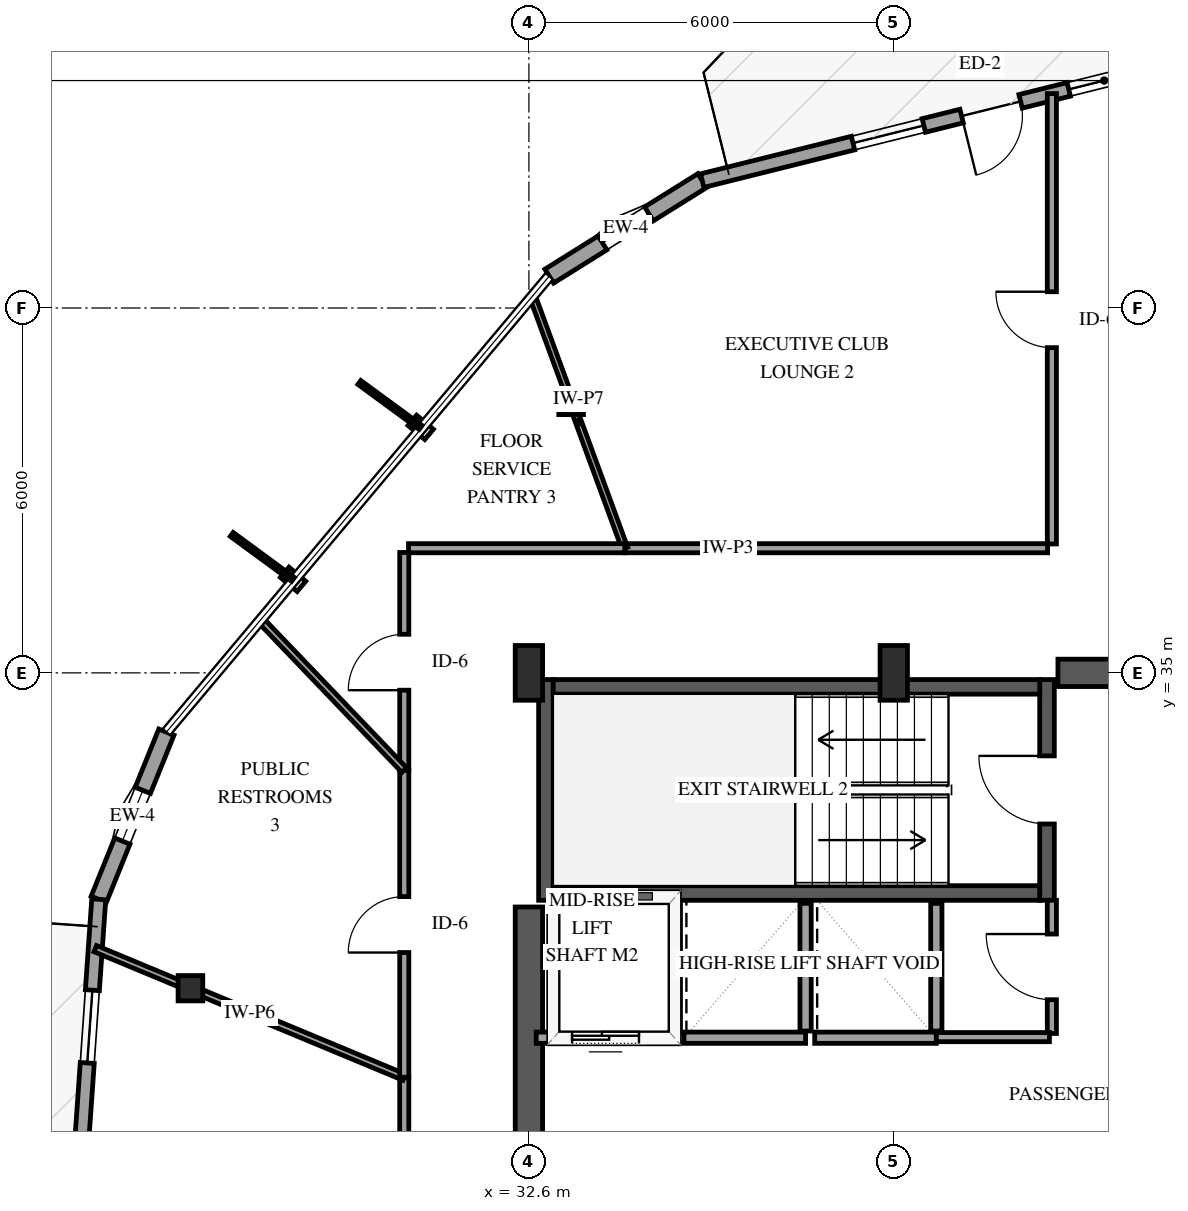
"""IFC4 building model, lengths in metres.
Left out: names, types, materials, properties, quantities, classifications, styles, units other than length and angle.
Written with IfcOpenShell. Run it as: python <this file> out.ifc"""

import sys

from ifc_helpers import new_model, si_unit, direction, frame, frame_2d, origin, origin_2d, place, context, subcontext, project, spatial, rectangle, i_section, extrude, element, fill, save


model = new_model("IFC4")
c1 = context("Model", 3, precision=1e-05, world=origin(), true_north=direction((0.0, 1.0)))
c2 = subcontext(c1, "Body", "Model", "MODEL_VIEW")
j1 = project(units=[si_unit("LENGTHUNIT", "METRE"), si_unit("PLANEANGLEUNIT", "RADIAN")], contexts=[c1])
p1 = place(None, origin())
s1 = spatial("IfcSite", under=j1, at=p1, CompositionType="ELEMENT")
p2 = place(p1, origin())
s2 = spatial("IfcBuilding", under=s1, at=p2, CompositionType="ELEMENT")
p3 = place(p2, frame((0.0, 0.0, 215.8)))
s3 = spatial("IfcBuildingStorey", under=s2, at=p3, CompositionType="ELEMENT", Elevation=215.8)
p4 = place(p3, frame((32.88, 31.26, 0.0), z_axis=(0.0, 0.0, 1.0), x_axis=(0.0, 1.0, 0.0)))
e1 = element("IfcWall", 1, at=p4, inside=s3, PredefinedType="SHEAR", context=c2, shape_type="SweptSolid", body=[
    extrude(rectangle(XDim=3.63, YDim=0.24, at=frame_2d((1.815, 0.0))), origin(), (0.0, 0.0, 1.0), 3.6),
])
p5 = place(p3, frame((41.12, 31.26, 0.0), z_axis=(0.0, 0.0, 1.0), x_axis=(0.0, 1.0, 0.0)))
e2 = element("IfcWall", 2, at=p5, inside=s3, PredefinedType="SHEAR", context=c2, shape_type="SweptSolid", body=[
    extrude(rectangle(XDim=3.63, YDim=0.24, at=frame_2d((1.815, 0.0))), origin(), (0.0, 0.0, 1.0), 3.6),
])
p6 = place(p5, frame((1.255, 0.0, 0.0)))
e3 = element("IfcOpeningElement", 3, at=p6, cuts=e2, PredefinedType="OPENING", context=c2, shape_type="SweptSolid", body=[
    extrude(rectangle(XDim=1.12, YDim=2.15, at=frame_2d((0.56, 1.075))), frame((0.0, 0.13, 0.0), z_axis=(0.0, -1.0, 0.0), x_axis=(1.0, 0.0, 0.0)), (0.0, 0.0, 1.0), 0.26),
])
for number, where, z_axis, x_axis in (
    (4, (33.0, 31.38, 0.0), (0.0, 0.0, 1.0), (1.0, 0.0, 0.0)),
    (5, (33.0, 34.77, 0.0), (0.0, 0.0, 1.0), (1.0, 0.0, 0.0)),
):
    element("IfcWall", number, at=place(p3, frame(where, z_axis=z_axis, x_axis=x_axis)), inside=s3, PredefinedType="SHEAR", context=c2, shape_type="SweptSolid", body=[
        extrude(rectangle(XDim=8.0, YDim=0.24, at=frame_2d((4.0, 0.0))), origin(), (0.0, 0.0, 1.0), 3.6),
    ])
p7 = place(p3, frame((32.6, 18.85, 0.0), z_axis=(0.0, 0.0, 1.0), x_axis=(0.0, 1.0, 0.0)))
e6 = element("IfcWall", 6, at=p7, inside=s3, PredefinedType="SHEAR", context=c2, shape_type="SweptSolid", body=[
    extrude(rectangle(XDim=12.3, YDim=0.45, at=frame_2d((6.15, 0.0))), origin(), (0.0, 0.0, 1.0), 3.6),
])
p8 = place(p3, frame((41.3, 35.0, 0.0), z_axis=(0.0, 0.0, 1.0), x_axis=(1.0, 0.0, 0.0)))
e7 = element("IfcWall", 7, at=p8, inside=s3, PredefinedType="SHEAR", context=c2, shape_type="SweptSolid", body=[
    extrude(rectangle(XDim=2.85, YDim=0.45, at=frame_2d((1.425, 0.0))), origin(), (0.0, 0.0, 1.0), 3.6),
])
for number, where, z_axis, x_axis in (
    (8, (32.6, 35.0, 0.0), (0.0, 0.0, 1.0), (1.0, 0.0, 0.0)),
    (9, (38.6, 35.0, 0.0), (0.0, 0.0, 1.0), (1.0, 0.0, 0.0)),
):
    element("IfcColumn", number, at=place(p3, frame(where, z_axis=z_axis, x_axis=x_axis)), inside=s3, PredefinedType="PILASTER", context=c2, shape_type="SweptSolid", body=[
        extrude(rectangle(XDim=0.45, YDim=0.9, at=origin_2d()), origin(), (0.0, 0.0, 1.0), 3.6),
    ])
for number, where, z_axis, x_axis in (
    (10, (33.295, 39.455, 0.0), (0.0, 0.0, 1.0), (1.0, 0.0, 0.0)),
    (11, (27.034, 29.814, 0.0), (0.0, 0.0, 1.0), (1.0, 0.0, 0.0)),
):
    element("IfcColumn", number, at=place(p3, frame(where, z_axis=z_axis, x_axis=x_axis)), inside=s3, PredefinedType="COLUMN", context=c2, shape_type="SweptSolid", body=[
        extrude(i_section(OverallWidth=0.406, OverallDepth=0.416, WebThickness=0.03, FlangeThickness=0.048, FilletRadius=0.038, at=origin_2d()), origin(), (0.0, 0.0, 1.0), 3.6),
    ])
p9 = place(p3, frame((35.45, 43.095, 0.0), z_axis=(0.0, 0.0, 1.0), x_axis=(-0.848215528767, -0.529651221805, 0.0)))
e12 = element("IfcWall", 12, at=p9, inside=s3, PredefinedType="SOLIDWALL", context=c2, shape_type="SweptSolid", body=[
    extrude(rectangle(XDim=2.967, YDim=0.27, at=frame_2d((1.483, 0.0))), origin(), (0.0, 0.0, 1.0), 2.679),
])
p10 = place(p9, frame((1.033, 0.0, 0.75)))
e13 = element("IfcOpeningElement", 13, at=p10, cuts=e12, PredefinedType="OPENING", context=c2, shape_type="SweptSolid", body=[
    extrude(rectangle(XDim=0.9, YDim=1.5, at=frame_2d((0.45, 0.75))), frame((0.0, 0.145, 0.0), z_axis=(0.0, -1.0, 0.0), x_axis=(1.0, 0.0, 0.0)), (0.0, 0.0, 1.0), 0.29),
])
p11 = place(p3, frame((44.951, 45.46, 0.0), z_axis=(0.0, 0.0, 1.0), x_axis=(-0.970379664845, -0.241584987229, 0.0)))
e14 = element("IfcWall", 14, at=p11, inside=s3, PredefinedType="SOLIDWALL", context=c2, shape_type="SweptSolid", body=[
    extrude(rectangle(XDim=9.791, YDim=0.23, at=frame_2d((4.895, 0.0))), origin(), (0.0, 0.0, 1.0), 2.679),
])
p12 = place(p11, frame((4.395, 0.0, 0.0)))
e15 = element("IfcOpeningElement", 15, at=p12, cuts=e14, PredefinedType="OPENING", context=c2, shape_type="SweptSolid", body=[
    extrude(rectangle(XDim=1.0, YDim=2.15, at=frame_2d((0.5, 1.075))), frame((0.0, 0.125, 0.0), z_axis=(0.0, -1.0, 0.0), x_axis=(1.0, 0.0, 0.0)), (0.0, 0.0, 1.0), 0.25),
])
p13 = place(p11, frame((2.379, 0.0, 0.72)))
e16 = element("IfcOpeningElement", 16, at=p13, cuts=e14, PredefinedType="OPENING", context=c2, shape_type="SweptSolid", body=[
    extrude(rectangle(XDim=1.2, YDim=1.6, at=frame_2d((0.6, 0.8))), frame((0.0, 0.125, 0.0), z_axis=(0.0, -1.0, 0.0), x_axis=(1.0, 0.0, 0.0)), (0.0, 0.0, 1.0), 0.25),
])
p14 = place(p11, frame((6.035, 0.0, 0.72)))
e17 = element("IfcOpeningElement", 17, at=p14, cuts=e14, PredefinedType="OPENING", context=c2, shape_type="SweptSolid", body=[
    extrude(rectangle(XDim=1.2, YDim=1.6, at=frame_2d((0.6, 0.8))), frame((0.0, 0.125, 0.0), z_axis=(0.0, -1.0, 0.0), x_axis=(1.0, 0.0, 0.0)), (0.0, 0.0, 1.0), 0.25),
])
p15 = place(p3, frame((26.638, 34.026, 0.0), z_axis=(0.0, 0.0, 1.0), x_axis=(-0.374963762446, -0.927039468875, 0.0)))
e18 = element("IfcWall", 18, at=p15, inside=s3, PredefinedType="SOLIDWALL", context=c2, shape_type="SweptSolid", body=[
    extrude(rectangle(XDim=2.967, YDim=0.27, at=frame_2d((1.483, 0.0))), origin(), (0.0, 0.0, 1.0), 2.679),
])
p16 = place(p15, frame((1.033, 0.0, 0.75)))
e19 = element("IfcOpeningElement", 19, at=p16, cuts=e18, PredefinedType="OPENING", context=c2, shape_type="SweptSolid", body=[
    extrude(rectangle(XDim=0.9, YDim=1.5, at=frame_2d((0.45, 0.75))), frame((0.0, 0.145, 0.0), z_axis=(0.0, -1.0, 0.0), x_axis=(1.0, 0.0, 0.0)), (0.0, 0.0, 1.0), 0.29),
])
p17 = place(p3, frame((25.526, 31.276, 0.0), z_axis=(0.0, 0.0, 1.0), x_axis=(-0.070121693516, -0.997538444421, 0.0)))
e20 = element("IfcWall", 20, at=p17, inside=s3, PredefinedType="SOLIDWALL", context=c2, shape_type="SweptSolid", body=[
    extrude(rectangle(XDim=9.791, YDim=0.23, at=frame_2d((4.895, 0.0))), origin(), (0.0, 0.0, 1.0), 2.679),
])
p18 = place(p17, frame((4.395, 0.0, 0.0)))
e21 = element("IfcOpeningElement", 21, at=p18, cuts=e20, PredefinedType="OPENING", context=c2, shape_type="SweptSolid", body=[
    extrude(rectangle(XDim=1.0, YDim=2.15, at=frame_2d((0.5, 1.075))), frame((0.0, 0.125, 0.0), z_axis=(0.0, -1.0, 0.0), x_axis=(1.0, 0.0, 0.0)), (0.0, 0.0, 1.0), 0.25),
])
p19 = place(p17, frame((1.498, 0.0, 0.72)))
e22 = element("IfcOpeningElement", 22, at=p19, cuts=e20, PredefinedType="OPENING", context=c2, shape_type="SweptSolid", body=[
    extrude(rectangle(XDim=1.2, YDim=1.6, at=frame_2d((0.6, 0.8))), frame((0.0, 0.125, 0.0), z_axis=(0.0, -1.0, 0.0), x_axis=(1.0, 0.0, 0.0)), (0.0, 0.0, 1.0), 0.25),
])
p20 = place(p17, frame((6.035, 0.0, 0.72)))
e23 = element("IfcOpeningElement", 23, at=p20, cuts=e20, PredefinedType="OPENING", context=c2, shape_type="SweptSolid", body=[
    extrude(rectangle(XDim=1.2, YDim=1.6, at=frame_2d((0.6, 0.8))), frame((0.0, 0.125, 0.0), z_axis=(0.0, -1.0, 0.0), x_axis=(1.0, 0.0, 0.0)), (0.0, 0.0, 1.0), 0.25),
])
p21 = place(p3, frame((32.72, 29.0, 0.0), z_axis=(0.0, 0.0, 1.0), x_axis=(1.0, 0.0, 0.0)))
e24 = element("IfcWall", 24, at=p21, inside=s3, PredefinedType="SOLIDWALL", context=c2, shape_type="SweptSolid", body=[
    extrude(rectangle(XDim=2.28, YDim=0.185, at=frame_2d((1.14, 0.0))), origin(), (0.0, 0.0, 1.0), 3.3),
])
p22 = place(p21, frame((0.59, 0.0, 0.0)))
e25 = element("IfcOpeningElement", 25, at=p22, cuts=e24, PredefinedType="OPENING", context=c2, shape_type="SweptSolid", body=[
    extrude(rectangle(XDim=1.1, YDim=2.15, at=frame_2d((0.55, 1.075))), frame((0.0, 0.103, 0.0), z_axis=(0.0, -1.0, 0.0), x_axis=(1.0, 0.0, 0.0)), (0.0, 0.0, 1.0), 0.205),
])
p23 = place(p3, frame((35.0, 29.11, 0.0), z_axis=(0.0, 0.0, 1.0), x_axis=(0.0, 1.0, 0.0)))
e26 = element("IfcWall", 26, at=p23, inside=s3, PredefinedType="SOLIDWALL", context=c2, shape_type="SweptSolid", body=[
    extrude(rectangle(XDim=2.1, YDim=0.185, at=frame_2d((1.05, 0.0))), origin(), (0.0, 0.0, 1.0), 3.3),
])
p24 = place(p3, frame((35.15, 29.0, 0.0), z_axis=(0.0, 0.0, 1.0), x_axis=(1.0, 0.0, 0.0)))
e27 = element("IfcWall", 27, at=p24, inside=s3, PredefinedType="SOLIDWALL", context=c2, shape_type="SweptSolid", body=[
    extrude(rectangle(XDim=2.0, YDim=0.185, at=frame_2d((1.0, 0.0))), origin(), (0.0, 0.0, 1.0), 3.3),
])
p25 = place(p3, frame((37.15, 29.11, 0.0), z_axis=(0.0, 0.0, 1.0), x_axis=(0.0, 1.0, 0.0)))
e28 = element("IfcWall", 28, at=p25, inside=s3, PredefinedType="SOLIDWALL", context=c2, shape_type="SweptSolid", body=[
    extrude(rectangle(XDim=2.1, YDim=0.185, at=frame_2d((1.05, 0.0))), origin(), (0.0, 0.0, 1.0), 3.3),
])
p26 = place(p3, frame((37.3, 29.0, 0.0), z_axis=(0.0, 0.0, 1.0), x_axis=(1.0, 0.0, 0.0)))
e29 = element("IfcWall", 29, at=p26, inside=s3, PredefinedType="SOLIDWALL", context=c2, shape_type="SweptSolid", body=[
    extrude(rectangle(XDim=2.0, YDim=0.185, at=frame_2d((1.0, 0.0))), origin(), (0.0, 0.0, 1.0), 3.3),
])
p27 = place(p3, frame((39.3, 29.11, 0.0), z_axis=(0.0, 0.0, 1.0), x_axis=(0.0, 1.0, 0.0)))
e30 = element("IfcWall", 30, at=p27, inside=s3, PredefinedType="SOLIDWALL", context=c2, shape_type="SweptSolid", body=[
    extrude(rectangle(XDim=2.1, YDim=0.185, at=frame_2d((1.05, 0.0))), origin(), (0.0, 0.0, 1.0), 3.3),
])
p28 = place(p3, frame((30.55, 20.106, 0.0), z_axis=(0.0, 0.0, 1.0), x_axis=(0.0, 1.0, 0.0)))
e31 = element("IfcWall", 31, at=p28, inside=s3, PredefinedType="PARTITIONING", context=c2, shape_type="SweptSolid", body=[
    extrude(rectangle(XDim=8.245, YDim=0.15, at=frame_2d((4.123, 0.0))), origin(), (0.0, 0.0, 1.0), 3.3),
])
p29 = place(p28, frame((3.647, 0.0, 0.0)))
e32 = element("IfcOpeningElement", 32, at=p29, cuts=e31, PredefinedType="OPENING", context=c2, shape_type="SweptSolid", body=[
    extrude(rectangle(XDim=0.92, YDim=2.12, at=frame_2d((0.46, 1.06))), frame((0.0, 0.085, 0.0), z_axis=(0.0, -1.0, 0.0), x_axis=(1.0, 0.0, 0.0)), (0.0, 0.0, 1.0), 0.17),
])
p30 = place(p3, frame((41.2, 37.12, 0.0), z_axis=(0.0, 0.0, 1.0), x_axis=(0.0, 1.0, 0.0)))
e33 = element("IfcWall", 33, at=p30, inside=s3, PredefinedType="PARTITIONING", context=c2, shape_type="SweptSolid", body=[
    extrude(rectangle(XDim=7.406, YDim=0.15, at=frame_2d((3.703, 0.0))), origin(), (0.0, 0.0, 1.0), 2.674),
])
p31 = place(p30, frame((3.228, 0.0, 0.0)))
e34 = element("IfcOpeningElement", 34, at=p31, cuts=e33, PredefinedType="OPENING", context=c2, shape_type="SweptSolid", body=[
    extrude(rectangle(XDim=0.92, YDim=2.12, at=frame_2d((0.46, 1.06))), frame((0.0, 0.085, 0.0), z_axis=(0.0, -1.0, 0.0), x_axis=(1.0, 0.0, 0.0)), (0.0, 0.0, 1.0), 0.17),
])
p32 = place(p3, frame((34.177, 37.05, 0.0), z_axis=(0.0, 0.0, 1.0), x_axis=(1.0, 0.0, 0.0)))
e35 = element("IfcWall", 35, at=p32, inside=s3, PredefinedType="PARTITIONING", context=c2, shape_type="SweptSolid", body=[
    extrude(rectangle(XDim=6.953, YDim=0.15, at=frame_2d((3.477, 0.0))), origin(), (0.0, 0.0, 1.0), 3.3),
])
p33 = place(p3, frame((30.55, 28.351, 0.0), z_axis=(0.0, 0.0, 1.0), x_axis=(-0.923276299753, 0.384136530826, 0.0)))
e36 = element("IfcWall", 36, at=p33, inside=s3, PredefinedType="PARTITIONING", context=c2, shape_type="SweptSolid", body=[
    extrude(rectangle(XDim=5.503, YDim=0.11, at=frame_2d((2.751, 0.0))), origin(), (0.0, 0.0, 1.0), 3.3),
])
p34 = place(p3, frame((30.55, 28.351, 0.0), z_axis=(0.0, 0.0, 1.0), x_axis=(0.0, 1.0, 0.0)))
e37 = element("IfcWall", 37, at=p34, inside=s3, PredefinedType="PARTITIONING", context=c2, shape_type="SweptSolid", body=[
    extrude(rectangle(XDim=5.05, YDim=0.15, at=frame_2d((2.525, 0.0))), origin(), (0.0, 0.0, 1.0), 3.3),
])
p35 = place(p34, frame((2.05, 0.0, 0.0)))
e38 = element("IfcOpeningElement", 38, at=p35, cuts=e37, PredefinedType="OPENING", context=c2, shape_type="SweptSolid", body=[
    extrude(rectangle(XDim=0.92, YDim=2.12, at=frame_2d((0.46, 1.06))), frame((0.0, 0.085, 0.0), z_axis=(0.0, -1.0, 0.0), x_axis=(1.0, 0.0, 0.0)), (0.0, 0.0, 1.0), 0.17),
])
p36 = place(p3, frame((34.177, 37.05, 0.0), z_axis=(0.0, 0.0, 1.0), x_axis=(-0.3443619088, 0.9388369804, 0.0)))
e39 = element("IfcWall", 39, at=p36, inside=s3, PredefinedType="PARTITIONING", context=c2, shape_type="SweptSolid", body=[
    extrude(rectangle(XDim=4.414, YDim=0.1, at=frame_2d((2.207, 0.0))), origin(), (0.0, 0.0, 1.0), 2.595),
])
p37 = place(p3, frame((30.55, 33.401, 0.0), z_axis=(0.0, 0.0, 1.0), x_axis=(0.0, 1.0, 0.0)))
e40 = element("IfcWall", 40, at=p37, inside=s3, PredefinedType="PARTITIONING", context=c2, shape_type="SweptSolid", body=[
    extrude(rectangle(XDim=3.579, YDim=0.15, at=frame_2d((1.79, 0.0))), origin(), (0.0, 0.0, 1.0), 3.3),
])
p38 = place(p37, frame((1.314, 0.0, 0.0)))
e41 = element("IfcOpeningElement", 41, at=p38, cuts=e40, PredefinedType="OPENING", context=c2, shape_type="SweptSolid", body=[
    extrude(rectangle(XDim=0.92, YDim=2.12, at=frame_2d((0.46, 1.06))), frame((0.0, 0.085, 0.0), z_axis=(0.0, -1.0, 0.0), x_axis=(1.0, 0.0, 0.0)), (0.0, 0.0, 1.0), 0.17),
])
p39 = place(p3, frame((30.62, 37.05, 0.0), z_axis=(0.0, 0.0, 1.0), x_axis=(1.0, 0.0, 0.0)))
e42 = element("IfcWall", 42, at=p39, inside=s3, PredefinedType="PARTITIONING", context=c2, shape_type="SweptSolid", body=[
    extrude(rectangle(XDim=3.557, YDim=0.15, at=frame_2d((1.778, 0.0))), origin(), (0.0, 0.0, 1.0), 3.3),
])
p40 = place(p3, frame((30.55, 33.401, 0.0), z_axis=(0.0, 0.0, 1.0), x_axis=(-0.691726910598, 0.722159179928, 0.0)))
e43 = element("IfcWall", 43, at=p40, inside=s3, PredefinedType="PARTITIONING", context=c2, shape_type="SweptSolid", body=[
    extrude(rectangle(XDim=3.417, YDim=0.11, at=frame_2d((1.709, 0.0))), origin(), (0.0, 0.0, 1.0), 3.3),
])
p41 = place(p3, frame((41.2, 29.07, 0.0), z_axis=(0.0, 0.0, 1.0), x_axis=(0.0, 1.0, 0.0)))
e44 = element("IfcWall", 44, at=p41, inside=s3, PredefinedType="PARTITIONING", context=c2, shape_type="SweptSolid", body=[
    extrude(rectangle(XDim=2.19, YDim=0.15, at=frame_2d((1.095, 0.0))), origin(), (0.0, 0.0, 1.0), 3.3),
])
p42 = place(p41, frame((0.555, 0.0, 0.0)))
e45 = element("IfcOpeningElement", 45, at=p42, cuts=e44, PredefinedType="OPENING", context=c2, shape_type="SweptSolid", body=[
    extrude(rectangle(XDim=1.08, YDim=2.15, at=frame_2d((0.54, 1.075))), frame((0.0, 0.085, 0.0), z_axis=(0.0, -1.0, 0.0), x_axis=(1.0, 0.0, 0.0)), (0.0, 0.0, 1.0), 0.17),
])
p43 = place(p3, frame((39.3, 29.01, 0.0), z_axis=(0.0, 0.0, 1.0), x_axis=(1.0, 0.0, 0.0)))
e46 = element("IfcWall", 46, at=p43, inside=s3, PredefinedType="PARTITIONING", context=c2, shape_type="SweptSolid", body=[
    extrude(rectangle(XDim=1.86, YDim=0.15, at=frame_2d((0.93, 0.0))), origin(), (0.0, 0.0, 1.0), 3.3),
])
p44 = place(p10, origin())
e47 = element("IfcWindow", 47, at=p44, inside=s3, PartitioningType="SINGLE_PANEL", PredefinedType="WINDOW", context=c2, shape_type="SweptSolid", body=[
    extrude(rectangle(XDim=0.9, YDim=1.5, at=frame_2d((0.45, 0.75))), frame((0.0, 0.03, 0.0), z_axis=(0.0, -1.0, 0.0), x_axis=(1.0, 0.0, 0.0)), (0.0, 0.0, 1.0), 0.06),
])
fill(e13, e47)
p45 = place(p12, origin())
e48 = element("IfcDoor", 48, at=p45, inside=s3, OperationType="SINGLE_SWING_RIGHT", PredefinedType="DOOR", context=c2, shape_type="SweptSolid", body=[
    extrude(rectangle(XDim=1.0, YDim=2.15, at=frame_2d((0.5, 1.075))), frame((0.0, 0.025, 0.0), z_axis=(0.0, -1.0, 0.0), x_axis=(1.0, 0.0, 0.0)), (0.0, 0.0, 1.0), 0.05),
])
fill(e15, e48)
p46 = place(p13, origin())
e49 = element("IfcWindow", 49, at=p46, inside=s3, PartitioningType="SINGLE_PANEL", PredefinedType="WINDOW", context=c2, shape_type="SweptSolid", body=[
    extrude(rectangle(XDim=1.2, YDim=1.6, at=frame_2d((0.6, 0.8))), frame((0.0, 0.03, 0.0), z_axis=(0.0, -1.0, 0.0), x_axis=(1.0, 0.0, 0.0)), (0.0, 0.0, 1.0), 0.06),
])
fill(e16, e49)
p47 = place(p14, origin())
e50 = element("IfcWindow", 50, at=p47, inside=s3, PartitioningType="SINGLE_PANEL", PredefinedType="WINDOW", context=c2, shape_type="SweptSolid", body=[
    extrude(rectangle(XDim=1.2, YDim=1.6, at=frame_2d((0.6, 0.8))), frame((0.0, 0.03, 0.0), z_axis=(0.0, -1.0, 0.0), x_axis=(1.0, 0.0, 0.0)), (0.0, 0.0, 1.0), 0.06),
])
fill(e17, e50)
p48 = place(p16, origin())
e51 = element("IfcWindow", 51, at=p48, inside=s3, PartitioningType="SINGLE_PANEL", PredefinedType="WINDOW", context=c2, shape_type="SweptSolid", body=[
    extrude(rectangle(XDim=0.9, YDim=1.5, at=frame_2d((0.45, 0.75))), frame((0.0, 0.03, 0.0), z_axis=(0.0, -1.0, 0.0), x_axis=(1.0, 0.0, 0.0)), (0.0, 0.0, 1.0), 0.06),
])
fill(e19, e51)
p49 = place(p19, origin())
e52 = element("IfcWindow", 52, at=p49, inside=s3, PartitioningType="SINGLE_PANEL", PredefinedType="WINDOW", context=c2, shape_type="SweptSolid", body=[
    extrude(rectangle(XDim=1.2, YDim=1.6, at=frame_2d((0.6, 0.8))), frame((0.0, 0.03, 0.0), z_axis=(0.0, -1.0, 0.0), x_axis=(1.0, 0.0, 0.0)), (0.0, 0.0, 1.0), 0.06),
])
fill(e22, e52)
p50 = place(p22, origin())
e53 = element("IfcDoor", 53, at=p50, inside=s3, OperationType="SLIDING_TO_LEFT", PredefinedType="DOOR", context=c2, shape_type="SweptSolid", body=[
    extrude(rectangle(XDim=1.1, YDim=2.15, at=frame_2d((0.55, 1.075))), frame((0.0, 0.025, 0.0), z_axis=(0.0, -1.0, 0.0), x_axis=(1.0, 0.0, 0.0)), (0.0, 0.0, 1.0), 0.05),
])
fill(e25, e53)
p51 = place(p6, origin())
e54 = element("IfcDoor", 54, at=p51, inside=s3, OperationType="SINGLE_SWING_RIGHT", PredefinedType="DOOR", context=c2, shape_type="SweptSolid", body=[
    extrude(rectangle(XDim=1.12, YDim=2.15, at=frame_2d((0.56, 1.075))), frame((0.0, 0.025, 0.0), z_axis=(0.0, -1.0, 0.0), x_axis=(1.0, 0.0, 0.0)), (0.0, 0.0, 1.0), 0.05),
])
fill(e3, e54)
p52 = place(p31, origin())
e55 = element("IfcDoor", 55, at=p52, inside=s3, OperationType="SINGLE_SWING_RIGHT", PredefinedType="DOOR", context=c2, shape_type="SweptSolid", body=[
    extrude(rectangle(XDim=0.92, YDim=2.12, at=frame_2d((0.46, 1.06))), frame((0.0, 0.025, 0.0), z_axis=(0.0, -1.0, 0.0), x_axis=(1.0, 0.0, 0.0)), (0.0, 0.0, 1.0), 0.05),
])
fill(e34, e55)
p53 = place(p35, origin())
e56 = element("IfcDoor", 56, at=p53, inside=s3, OperationType="SINGLE_SWING_LEFT", PredefinedType="DOOR", context=c2, shape_type="SweptSolid", body=[
    extrude(rectangle(XDim=0.92, YDim=2.12, at=frame_2d((0.46, 1.06))), frame((0.0, 0.025, 0.0), z_axis=(0.0, -1.0, 0.0), x_axis=(1.0, 0.0, 0.0)), (0.0, 0.0, 1.0), 0.05),
])
fill(e38, e56)
p54 = place(p38, origin())
e57 = element("IfcDoor", 57, at=p54, inside=s3, OperationType="SINGLE_SWING_LEFT", PredefinedType="DOOR", context=c2, shape_type="SweptSolid", body=[
    extrude(rectangle(XDim=0.92, YDim=2.12, at=frame_2d((0.46, 1.06))), frame((0.0, 0.025, 0.0), z_axis=(0.0, -1.0, 0.0), x_axis=(1.0, 0.0, 0.0)), (0.0, 0.0, 1.0), 0.05),
])
fill(e41, e57)
p55 = place(p42, origin())
e58 = element("IfcDoor", 58, at=p55, inside=s3, OperationType="SINGLE_SWING_RIGHT", PredefinedType="DOOR", context=c2, shape_type="SweptSolid", body=[
    extrude(rectangle(XDim=1.08, YDim=2.15, at=frame_2d((0.54, 1.075))), frame((0.0, 0.025, 0.0), z_axis=(0.0, -1.0, 0.0), x_axis=(1.0, 0.0, 0.0)), (0.0, 0.0, 1.0), 0.05),
])
fill(e45, e58)
save(model, sys.argv[1])
